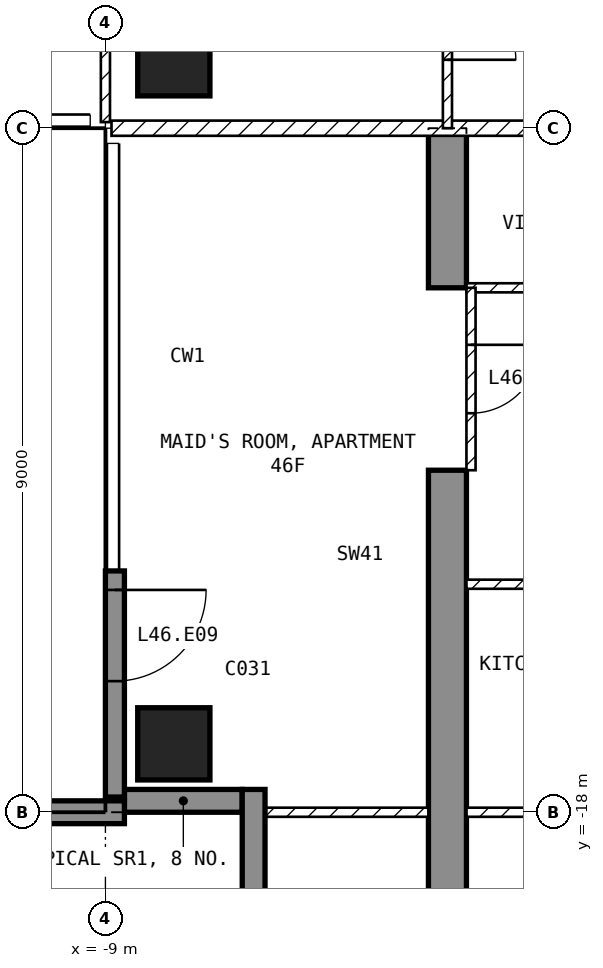
"""IFC4 building model, lengths in metres.
Left out: names, types, materials, properties, quantities, classifications, styles, units other than length and angle.
Written with IfcOpenShell. Run it as: python <this file> out.ifc"""

import sys

from ifc_helpers import new_model, si_unit, direction, frame, frame_2d, origin, origin_2d, place, context, subcontext, project, spatial, polyline, rectangle, outline, extrude, element, fill, save


model = new_model("IFC4")
c1 = context("Model", 3, precision=1e-05, world=origin(), true_north=direction((0.0, 1.0)))
c2 = subcontext(c1, "Body", "Model", "MODEL_VIEW")
j1 = project(units=[si_unit("LENGTHUNIT", "METRE"), si_unit("PLANEANGLEUNIT", "RADIAN")], contexts=[c1])
p1 = place(None, origin())
s1 = spatial("IfcSite", under=j1, at=p1, CompositionType="ELEMENT")
p2 = place(p1, origin())
s2 = spatial("IfcBuilding", under=s1, at=p2, CompositionType="ELEMENT")
p3 = place(p2, frame((0.0, 0.0, 187.6)))
s3 = spatial("IfcBuildingStorey", under=s2, at=p3, CompositionType="ELEMENT", Elevation=187.6)
for number, where, z_axis, x_axis in (
    (1, (-8.1, -17.1, -0.25), (0.0, 0.0, 1.0), (1.0, 0.0, 0.0)),
    (2, (-8.1, -8.1, -0.25), (0.0, 0.0, 1.0), (1.0, 0.0, 0.0)),
):
    element("IfcColumn", number, at=place(p3, frame(where, z_axis=z_axis, x_axis=x_axis)), inside=s3, PredefinedType="COLUMN", context=c2, shape_type="SweptSolid", body=[
        extrude(rectangle(XDim=0.95, YDim=0.95, at=origin_2d()), origin(), (0.0, 0.0, 1.0), 3.5),
    ])
p4 = place(p3, frame((-4.75, -20.225, -0.25), z_axis=(1.0, 0.0, 0.0), x_axis=(0.0, 1.0, 0.0)))
e3 = element("IfcWall", 3, at=p4, inside=s3, PredefinedType="SHEAR", context=c2, shape_type="SweptSolid", body=[
    extrude(outline(polyline([(0.0, 0.0), (6.725, 0.0), (6.725, 2.65), (9.125, 2.65), (9.125, 0.0), (11.225, 0.0), (11.225, 3.5), (0.0, 3.5), (0.0, 0.0)])), origin(), (0.0, 0.0, 1.0), 0.5),
])
p5 = place(p3, frame((-8.875, -14.825, 0.0), z_axis=(0.0, 0.0, 1.0), x_axis=(0.0, -1.0, 0.0)))
e4 = element("IfcWall", 4, at=p5, inside=s3, PredefinedType="SOLIDWALL", context=c2, shape_type="SweptSolid", body=[
    extrude(rectangle(XDim=2.975, YDim=0.25, at=frame_2d((1.488, 0.0))), origin(), (0.0, 0.0, 1.0), 3.25),
])
p6 = place(p5, frame((0.25, 0.0, 0.0)))
e5 = element("IfcOpeningElement", 5, at=p6, cuts=e4, PredefinedType="OPENING", context=c2, shape_type="SweptSolid", body=[
    extrude(rectangle(XDim=1.2, YDim=2.4, at=frame_2d((0.6, 1.2))), frame((0.0, 0.135, 0.0), z_axis=(0.0, -1.0, 0.0), x_axis=(1.0, 0.0, 0.0)), (0.0, 0.0, 1.0), 0.27),
])
p7 = place(p3, frame((-8.75, -17.85, 0.0), z_axis=(0.0, 0.0, 1.0), x_axis=(1.0, 0.0, 0.0)))
e6 = element("IfcWall", 6, at=p7, inside=s3, PredefinedType="SOLIDWALL", context=c2, shape_type="SweptSolid", body=[
    extrude(rectangle(XDim=1.55, YDim=0.3, at=frame_2d((0.775, 0.0))), origin(), (0.0, 0.0, 1.0), 3.25),
])
p8 = place(p3, frame((-7.05, -17.7, 0.0), z_axis=(0.0, 0.0, 1.0), x_axis=(0.0, -1.0, 0.0)))
e7 = element("IfcWall", 7, at=p8, inside=s3, PredefinedType="SOLIDWALL", context=c2, shape_type="SweptSolid", body=[
    extrude(rectangle(XDim=1.8, YDim=0.3, at=frame_2d((0.9, 0.0))), origin(), (0.0, 0.0, 1.0), 3.25),
])
p9 = place(p3, frame((-8.75, -18.0, 0.0), z_axis=(0.0, 0.0, 1.0), x_axis=(-1.0, 0.0, 0.0)))
e8 = element("IfcWall", 8, at=p9, inside=s3, PredefinedType="SOLIDWALL", context=c2, shape_type="SweptSolid", body=[
    extrude(rectangle(XDim=2.95, YDim=0.3, at=frame_2d((1.475, 0.0))), origin(), (0.0, 0.0, 1.0), 3.25),
])
p10 = place(p3, frame((8.92, -9.0, 0.0), z_axis=(0.0, 0.0, 1.0), x_axis=(-1.0, 0.0, 0.0)))
e9 = element("IfcWall", 9, at=p10, inside=s3, PredefinedType="PARTITIONING", context=c2, shape_type="SweptSolid", body=[
    extrude(rectangle(XDim=17.84, YDim=0.2, at=frame_2d((8.92, 0.0))), origin(), (0.0, 0.0, 1.0), 3.25),
])
p11 = place(p10, frame((8.42, 0.0, 0.0)))
e10 = element("IfcOpeningElement", 10, at=p11, cuts=e9, PredefinedType="OPENING", context=c2, shape_type="SweptSolid", body=[
    extrude(rectangle(XDim=1.0, YDim=2.1, at=frame_2d((0.5, 1.05))), frame((0.0, 0.11, 0.0), z_axis=(0.0, -1.0, 0.0), x_axis=(1.0, 0.0, 0.0)), (0.0, 0.0, 1.0), 0.22),
])
p12 = place(p3, frame((-9.0, -1.3, 0.0), z_axis=(0.0, 0.0, 1.0), x_axis=(0.0, -1.0, 0.0)))
e11 = element("IfcWall", 11, at=p12, inside=s3, PredefinedType="PARTITIONING", context=c2, shape_type="SweptSolid", body=[
    extrude(rectangle(XDim=7.62, YDim=0.12, at=frame_2d((3.81, 0.0))), origin(), (0.0, 0.0, 1.0), 3.25),
])
p13 = place(p12, frame((1.15, 0.0, 0.0)))
e12 = element("IfcOpeningElement", 12, at=p13, cuts=e11, PredefinedType="OPENING", context=c2, shape_type="SweptSolid", body=[
    extrude(rectangle(XDim=0.9, YDim=2.1, at=frame_2d((0.45, 1.05))), frame((0.0, 0.07, 0.0), z_axis=(0.0, -1.0, 0.0), x_axis=(1.0, 0.0, 0.0)), (0.0, 0.0, 1.0), 0.14),
])
p14 = place(p3, frame((-4.5, -6.3, 0.0), z_axis=(0.0, 0.0, 1.0), x_axis=(0.0, -1.0, 0.0)))
e13 = element("IfcWall", 13, at=p14, inside=s3, PredefinedType="PARTITIONING", context=c2, shape_type="SweptSolid", body=[
    extrude(rectangle(XDim=2.7, YDim=0.12, at=frame_2d((1.35, 0.0))), origin(), (0.0, 0.0, 1.0), 3.25),
])
p15 = place(p14, frame((0.9, 0.0, 0.0)))
e14 = element("IfcOpeningElement", 14, at=p15, cuts=e13, PredefinedType="OPENING", context=c2, shape_type="SweptSolid", body=[
    extrude(rectangle(XDim=0.9, YDim=2.1, at=frame_2d((0.45, 1.05))), frame((0.0, 0.07, 0.0), z_axis=(0.0, -1.0, 0.0), x_axis=(1.0, 0.0, 0.0)), (0.0, 0.0, 1.0), 0.14),
])
p16 = place(p3, frame((2.1, -11.1, 0.0), z_axis=(0.0, 0.0, 1.0), x_axis=(-1.0, 0.0, 0.0)))
e15 = element("IfcWall", 15, at=p16, inside=s3, PredefinedType="PARTITIONING", context=c2, shape_type="SweptSolid", body=[
    extrude(rectangle(XDim=6.35, YDim=0.12, at=frame_2d((3.175, 0.0))), origin(), (0.0, 0.0, 1.0), 3.25),
])
p17 = place(p16, frame((2.725, 0.0, 0.0)))
e16 = element("IfcOpeningElement", 16, at=p17, cuts=e15, PredefinedType="OPENING", context=c2, shape_type="SweptSolid", body=[
    extrude(rectangle(XDim=0.9, YDim=2.1, at=frame_2d((0.45, 1.05))), frame((0.0, 0.07, 0.0), z_axis=(0.0, -1.0, 0.0), x_axis=(1.0, 0.0, 0.0)), (0.0, 0.0, 1.0), 0.14),
])
p18 = place(p3, frame((-0.44, -15.0, 0.0), z_axis=(0.0, 0.0, 1.0), x_axis=(-1.0, 0.0, 0.0)))
e17 = element("IfcWall", 17, at=p18, inside=s3, PredefinedType="PARTITIONING", context=c2, shape_type="SweptSolid", body=[
    extrude(rectangle(XDim=3.81, YDim=0.12, at=frame_2d((1.905, 0.0))), origin(), (0.0, 0.0, 1.0), 3.25),
])
p19 = place(p3, frame((4.25, -18.0, 0.0), z_axis=(0.0, 0.0, 1.0), x_axis=(-1.0, 0.0, 0.0)))
e18 = element("IfcWall", 18, at=p19, inside=s3, PredefinedType="PARTITIONING", context=c2, shape_type="SweptSolid", body=[
    extrude(rectangle(XDim=8.5, YDim=0.12, at=frame_2d((4.25, 0.0))), origin(), (0.0, 0.0, 1.0), 3.25),
])
p20 = place(p19, frame((1.925, 0.0, 0.0)))
e19 = element("IfcOpeningElement", 19, at=p20, cuts=e18, PredefinedType="OPENING", context=c2, shape_type="SweptSolid", body=[
    extrude(rectangle(XDim=0.9, YDim=2.1, at=frame_2d((0.45, 1.05))), frame((0.0, 0.07, 0.0), z_axis=(0.0, -1.0, 0.0), x_axis=(1.0, 0.0, 0.0)), (0.0, 0.0, 1.0), 0.14),
])
p21 = place(p3, frame((-4.75, -18.0, 0.0), z_axis=(0.0, 0.0, 1.0), x_axis=(-1.0, 0.0, 0.0)))
e20 = element("IfcWall", 20, at=p21, inside=s3, PredefinedType="PARTITIONING", context=c2, shape_type="SweptSolid", body=[
    extrude(rectangle(XDim=2.37, YDim=0.12, at=frame_2d((1.185, 0.0))), origin(), (0.0, 0.0, 1.0), 3.25),
])
p22 = place(p3, frame((-4.19, -11.1, 0.0), z_axis=(0.0, 0.0, 1.0), x_axis=(0.0, -1.0, 0.0)))
e21 = element("IfcWall", 21, at=p22, inside=s3, PredefinedType="PARTITIONING", context=c2, shape_type="SweptSolid", body=[
    extrude(rectangle(XDim=2.4, YDim=0.12, at=frame_2d((1.2, 0.0))), origin(), (0.0, 0.0, 1.0), 2.4),
])
p23 = place(p22, frame((0.75, 0.0, 0.0)))
e22 = element("IfcOpeningElement", 22, at=p23, cuts=e21, PredefinedType="OPENING", context=c2, shape_type="SweptSolid", body=[
    extrude(rectangle(XDim=0.9, YDim=2.1, at=frame_2d((0.45, 1.05))), frame((0.0, 0.07, 0.0), z_axis=(0.0, -1.0, 0.0), x_axis=(1.0, 0.0, 0.0)), (0.0, 0.0, 1.0), 0.14),
])
p24 = place(p6, origin())
e23 = element("IfcDoor", 23, at=p24, inside=s3, OperationType="SINGLE_SWING_LEFT", PredefinedType="DOOR", context=c2, shape_type="SweptSolid", body=[
    extrude(rectangle(XDim=1.2, YDim=2.4, at=frame_2d((0.6, 1.2))), frame((0.0, 0.025, 0.0), z_axis=(0.0, -1.0, 0.0), x_axis=(1.0, 0.0, 0.0)), (0.0, 0.0, 1.0), 0.05),
])
fill(e5, e23)
p25 = place(p15, origin())
e24 = element("IfcDoor", 24, at=p25, inside=s3, OperationType="SINGLE_SWING_RIGHT", PredefinedType="DOOR", context=c2, shape_type="SweptSolid", body=[
    extrude(rectangle(XDim=0.9, YDim=2.1, at=frame_2d((0.45, 1.05))), frame((0.0, 0.025, 0.0), z_axis=(0.0, -1.0, 0.0), x_axis=(1.0, 0.0, 0.0)), (0.0, 0.0, 1.0), 0.05),
])
fill(e14, e24)
p26 = place(p23, origin())
e25 = element("IfcDoor", 25, at=p26, inside=s3, OperationType="SINGLE_SWING_LEFT", PredefinedType="DOOR", context=c2, shape_type="SweptSolid", body=[
    extrude(rectangle(XDim=0.9, YDim=2.1, at=frame_2d((0.45, 1.05))), frame((0.0, 0.025, 0.0), z_axis=(0.0, -1.0, 0.0), x_axis=(1.0, 0.0, 0.0)), (0.0, 0.0, 1.0), 0.05),
])
fill(e22, e25)
save(model, sys.argv[1])
